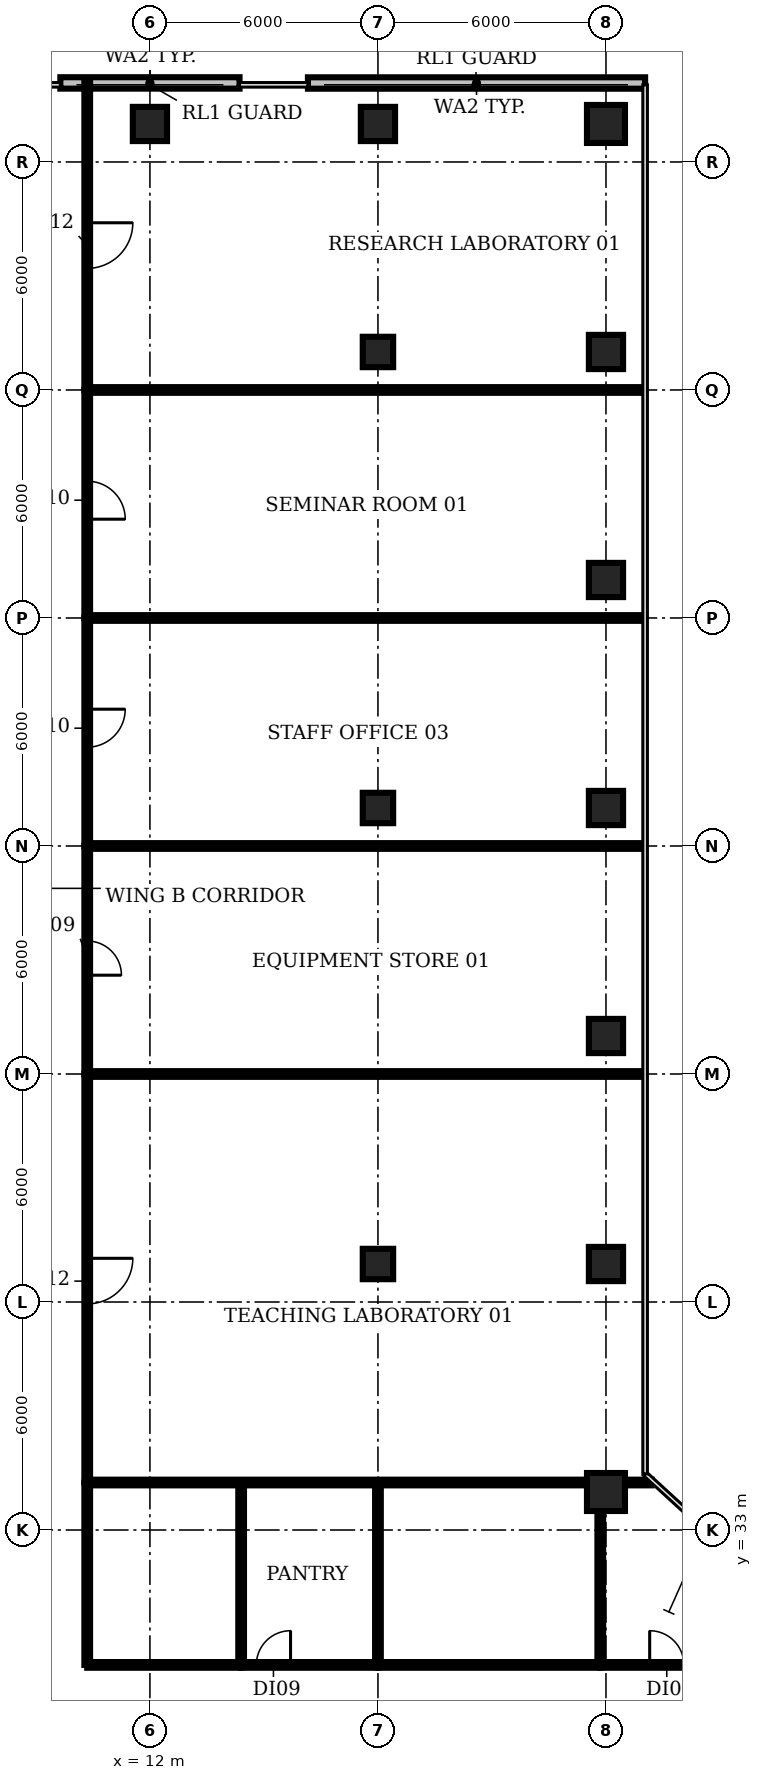
"""IFC4 building model, lengths in metres.
Left out: names, types, materials, properties, quantities, classifications, styles, units other than length and angle.
Written with IfcOpenShell. Run it as: python <this file> out.ifc"""

import sys

from ifc_helpers import new_model, si_unit, direction, frame, frame_2d, origin, origin_2d, place, context, subcontext, project, spatial, rectangle, circle, extrude, element, fill, save


model = new_model("IFC4")
c1 = context("Model", 3, precision=1e-05, world=origin(), true_north=direction((0.0, 1.0)))
c2 = subcontext(c1, "Body", "Model", "MODEL_VIEW")
j1 = project(units=[si_unit("LENGTHUNIT", "METRE"), si_unit("PLANEANGLEUNIT", "RADIAN")], contexts=[c1])
p1 = place(None, origin())
s1 = spatial("IfcSite", under=j1, at=p1, CompositionType="ELEMENT")
p2 = place(p1, origin())
s2 = spatial("IfcBuilding", under=s1, at=p2, CompositionType="ELEMENT")
p3 = place(p2, frame((0.0, 0.0, 100.4)))
s3 = spatial("IfcBuildingStorey", under=s2, at=p3, CompositionType="ELEMENT", Elevation=100.4)
p4 = place(p3, frame((12.0, 70.0, 0.0), z_axis=(0.0, 0.0, 1.0), x_axis=(1.0, 0.0, 0.0)))
e1 = element("IfcColumn", 1, at=p4, inside=s3, PredefinedType="COLUMN", context=c2, shape_type="SweptSolid", body=[
    extrude(rectangle(XDim=0.9, YDim=0.9, at=origin_2d()), origin(), (0.0, 0.0, 1.0), 3.85),
])
for number, where, z_axis, x_axis in (
    (2, (18.0, 40.0, 0.0), (0.0, 0.0, 1.0), (1.0, 0.0, 0.0)),
    (3, (18.0, 52.0, 0.0), (0.0, 0.0, 1.0), (1.0, 0.0, 0.0)),
    (4, (18.0, 64.0, 0.0), (0.0, 0.0, 1.0), (1.0, 0.0, 0.0)),
):
    element("IfcColumn", number, at=place(p3, frame(where, z_axis=z_axis, x_axis=x_axis)), inside=s3, PredefinedType="COLUMN", context=c2, shape_type="SweptSolid", body=[
        extrude(rectangle(XDim=0.8, YDim=0.8, at=origin_2d()), origin(), (0.0, 0.0, 1.0), 3.85),
    ])
p5 = place(p3, frame((18.0, 70.0, 0.0), z_axis=(0.0, 0.0, 1.0), x_axis=(1.0, 0.0, 0.0)))
e5 = element("IfcColumn", 5, at=p5, inside=s3, PredefinedType="COLUMN", context=c2, shape_type="SweptSolid", body=[
    extrude(rectangle(XDim=0.9, YDim=0.9, at=origin_2d()), origin(), (0.0, 0.0, 1.0), 3.85),
])
p6 = place(p3, frame((24.0, 34.0, 0.0), z_axis=(0.0, 0.0, 1.0), x_axis=(1.0, 0.0, 0.0)))
e6 = element("IfcColumn", 6, at=p6, inside=s3, PredefinedType="COLUMN", context=c2, shape_type="SweptSolid", body=[
    extrude(circle(Radius=0.5, at=origin_2d()), origin(), (0.0, 0.0, 1.0), 3.85),
])
for number, where, z_axis, x_axis in (
    (7, (24.0, 40.0, 0.0), (0.0, 0.0, 1.0), (1.0, 0.0, 0.0)),
    (8, (24.0, 46.0, 0.0), (0.0, 0.0, 1.0), (1.0, 0.0, 0.0)),
    (9, (24.0, 52.0, 0.0), (0.0, 0.0, 1.0), (1.0, 0.0, 0.0)),
    (10, (24.0, 58.0, 0.0), (0.0, 0.0, 1.0), (1.0, 0.0, 0.0)),
    (11, (24.0, 64.0, 0.0), (0.0, 0.0, 1.0), (1.0, 0.0, 0.0)),
):
    element("IfcColumn", number, at=place(p3, frame(where, z_axis=z_axis, x_axis=x_axis)), inside=s3, PredefinedType="COLUMN", context=c2, shape_type="SweptSolid", body=[
        extrude(rectangle(XDim=0.9, YDim=0.9, at=origin_2d()), origin(), (0.0, 0.0, 1.0), 3.85),
    ])
p7 = place(p3, frame((24.0, 70.0, 0.0), z_axis=(0.0, 0.0, 1.0), x_axis=(1.0, 0.0, 0.0)))
e12 = element("IfcColumn", 12, at=p7, inside=s3, PredefinedType="COLUMN", context=c2, shape_type="SweptSolid", body=[
    extrude(circle(Radius=0.5, at=origin_2d()), origin(), (0.0, 0.0, 1.0), 3.85),
])
p8 = place(p3, frame((25.03, 71.078, 0.0), z_axis=(0.0, 0.0, 1.0), x_axis=(-1.0, 0.0, 0.0)))
e13 = element("IfcWall", 13, at=p8, inside=s3, PredefinedType="SOLIDWALL", context=c2, shape_type="SweptSolid", body=[
    extrude(rectangle(XDim=8.873, YDim=0.3, at=frame_2d((4.436, 0.0))), origin(), (0.0, 0.0, 1.0), 3.85),
])
p9 = place(p3, frame((14.357, 71.08, 0.0), z_axis=(0.0, 0.0, 1.0), x_axis=(-1.0, 0.0, 0.0)))
e14 = element("IfcWall", 14, at=p9, inside=s3, PredefinedType="SOLIDWALL", context=c2, shape_type="SweptSolid", body=[
    extrude(rectangle(XDim=4.715, YDim=0.3, at=frame_2d((2.357, 0.0))), origin(), (0.0, 0.0, 1.0), 3.85),
])
p10 = place(p3, frame((10.35, 29.45, 0.0), z_axis=(0.0, 0.0, 1.0), x_axis=(0.0, 1.0, 0.0)))
e15 = element("IfcWall", 15, at=p10, inside=s3, PredefinedType="PARTITIONING", context=c2, shape_type="SweptSolid", body=[
    extrude(rectangle(XDim=4.8, YDim=0.15, at=frame_2d((2.4, 0.0))), origin(), (0.0, 0.0, 1.0), 2.83),
])
p11 = place(p3, frame((10.35, 29.45, 0.0), z_axis=(0.0, 0.0, 1.0), x_axis=(1.0, 0.0, 0.0)))
e16 = element("IfcWall", 16, at=p11, inside=s3, PredefinedType="PARTITIONING", context=c2, shape_type="SweptSolid", body=[
    extrude(rectangle(XDim=4.05, YDim=0.15, at=frame_2d((2.025, 0.0))), origin(), (0.0, 0.0, 1.0), 2.83),
])
p12 = place(p3, frame((10.35, 34.25, 0.0), z_axis=(0.0, 0.0, 1.0), x_axis=(1.0, 0.0, 0.0)))
e17 = element("IfcWall", 17, at=p12, inside=s3, PredefinedType="PARTITIONING", context=c2, shape_type="SweptSolid", body=[
    extrude(rectangle(XDim=14.85, YDim=0.15, at=frame_2d((7.425, 0.0))), origin(), (0.0, 0.0, 1.0), 2.83),
])
p13 = place(p3, frame((10.35, 45.0, 0.0), z_axis=(0.0, 0.0, 1.0), x_axis=(0.0, -1.0, 0.0)))
e18 = element("IfcWall", 18, at=p13, inside=s3, PredefinedType="PARTITIONING", context=c2, shape_type="SweptSolid", body=[
    extrude(rectangle(XDim=10.75, YDim=0.15, at=frame_2d((5.375, 0.0))), origin(), (0.0, 0.0, 1.0), 2.83),
])
p14 = place(p13, frame((4.85, 0.0, 0.0)))
e19 = element("IfcOpeningElement", 19, at=p14, cuts=e18, PredefinedType="OPENING", context=c2, shape_type="SweptSolid", body=[
    extrude(rectangle(XDim=1.2, YDim=2.1, at=frame_2d((0.6, 1.05))), frame((0.0, 0.085, 0.0), z_axis=(0.0, -1.0, 0.0), x_axis=(1.0, 0.0, 0.0)), (0.0, 0.0, 1.0), 0.17),
])
p15 = place(p3, frame((10.35, 45.0, 0.0), z_axis=(0.0, 0.0, 1.0), x_axis=(1.0, 0.0, 0.0)))
e20 = element("IfcWall", 20, at=p15, inside=s3, PredefinedType="PARTITIONING", context=c2, shape_type="SweptSolid", body=[
    extrude(rectangle(XDim=14.63, YDim=0.15, at=frame_2d((7.315, 0.0))), origin(), (0.0, 0.0, 1.0), 2.83),
])
p16 = place(p3, frame((10.35, 51.0, 0.0), z_axis=(0.0, 0.0, 1.0), x_axis=(0.0, -1.0, 0.0)))
e21 = element("IfcWall", 21, at=p16, inside=s3, PredefinedType="PARTITIONING", context=c2, shape_type="SweptSolid", body=[
    extrude(rectangle(XDim=6.0, YDim=0.15, at=frame_2d((3.0, 0.0))), origin(), (0.0, 0.0, 1.0), 2.83),
])
p17 = place(p16, frame((2.5, 0.0, 0.0)))
e22 = element("IfcOpeningElement", 22, at=p17, cuts=e21, PredefinedType="OPENING", context=c2, shape_type="SweptSolid", body=[
    extrude(rectangle(XDim=0.9, YDim=2.1, at=frame_2d((0.45, 1.05))), frame((0.0, 0.085, 0.0), z_axis=(0.0, -1.0, 0.0), x_axis=(1.0, 0.0, 0.0)), (0.0, 0.0, 1.0), 0.17),
])
p18 = place(p3, frame((10.35, 51.0, 0.0), z_axis=(0.0, 0.0, 1.0), x_axis=(1.0, 0.0, 0.0)))
e23 = element("IfcWall", 23, at=p18, inside=s3, PredefinedType="PARTITIONING", context=c2, shape_type="SweptSolid", body=[
    extrude(rectangle(XDim=14.63, YDim=0.15, at=frame_2d((7.315, 0.0))), origin(), (0.0, 0.0, 1.0), 2.83),
])
p19 = place(p3, frame((10.35, 57.0, 0.0), z_axis=(0.0, 0.0, 1.0), x_axis=(0.0, -1.0, 0.0)))
e24 = element("IfcWall", 24, at=p19, inside=s3, PredefinedType="PARTITIONING", context=c2, shape_type="SweptSolid", body=[
    extrude(rectangle(XDim=6.0, YDim=0.15, at=frame_2d((3.0, 0.0))), origin(), (0.0, 0.0, 1.0), 2.83),
])
p20 = place(p19, frame((2.4, 0.0, 0.0)))
e25 = element("IfcOpeningElement", 25, at=p20, cuts=e24, PredefinedType="OPENING", context=c2, shape_type="SweptSolid", body=[
    extrude(rectangle(XDim=1.0, YDim=2.1, at=frame_2d((0.5, 1.05))), frame((0.0, 0.085, 0.0), z_axis=(0.0, -1.0, 0.0), x_axis=(1.0, 0.0, 0.0)), (0.0, 0.0, 1.0), 0.17),
])
p21 = place(p3, frame((10.35, 57.0, 0.0), z_axis=(0.0, 0.0, 1.0), x_axis=(1.0, 0.0, 0.0)))
e26 = element("IfcWall", 26, at=p21, inside=s3, PredefinedType="PARTITIONING", context=c2, shape_type="SweptSolid", body=[
    extrude(rectangle(XDim=14.63, YDim=0.15, at=frame_2d((7.315, 0.0))), origin(), (0.0, 0.0, 1.0), 2.83),
])
p22 = place(p3, frame((10.35, 63.0, 0.0), z_axis=(0.0, 0.0, 1.0), x_axis=(0.0, -1.0, 0.0)))
e27 = element("IfcWall", 27, at=p22, inside=s3, PredefinedType="PARTITIONING", context=c2, shape_type="SweptSolid", body=[
    extrude(rectangle(XDim=6.0, YDim=0.15, at=frame_2d((3.0, 0.0))), origin(), (0.0, 0.0, 1.0), 2.83),
])
p23 = place(p22, frame((2.4, 0.0, 0.0)))
e28 = element("IfcOpeningElement", 28, at=p23, cuts=e27, PredefinedType="OPENING", context=c2, shape_type="SweptSolid", body=[
    extrude(rectangle(XDim=1.0, YDim=2.1, at=frame_2d((0.5, 1.05))), frame((0.0, 0.085, 0.0), z_axis=(0.0, -1.0, 0.0), x_axis=(1.0, 0.0, 0.0)), (0.0, 0.0, 1.0), 0.17),
])
p24 = place(p3, frame((10.35, 63.0, 0.0), z_axis=(0.0, 0.0, 1.0), x_axis=(1.0, 0.0, 0.0)))
e29 = element("IfcWall", 29, at=p24, inside=s3, PredefinedType="PARTITIONING", context=c2, shape_type="SweptSolid", body=[
    extrude(rectangle(XDim=14.63, YDim=0.15, at=frame_2d((7.315, 0.0))), origin(), (0.0, 0.0, 1.0), 2.83),
])
p25 = place(p3, frame((10.35, 71.09, 0.0), z_axis=(0.0, 0.0, 1.0), x_axis=(0.0, -1.0, 0.0)))
e30 = element("IfcWall", 30, at=p25, inside=s3, PredefinedType="PARTITIONING", context=c2, shape_type="SweptSolid", body=[
    extrude(rectangle(XDim=8.09, YDim=0.15, at=frame_2d((4.045, 0.0))), origin(), (0.0, 0.0, 1.0), 2.83),
])
p26 = place(p25, frame((3.69, 0.0, 0.0)))
e31 = element("IfcOpeningElement", 31, at=p26, cuts=e30, PredefinedType="OPENING", context=c2, shape_type="SweptSolid", body=[
    extrude(rectangle(XDim=1.2, YDim=2.1, at=frame_2d((0.6, 1.05))), frame((0.0, 0.085, 0.0), z_axis=(0.0, -1.0, 0.0), x_axis=(1.0, 0.0, 0.0)), (0.0, 0.0, 1.0), 0.17),
])
p27 = place(p3, frame((14.4, 29.45, 0.0), z_axis=(0.0, 0.0, 1.0), x_axis=(0.0, 1.0, 0.0)))
e32 = element("IfcWall", 32, at=p27, inside=s3, PredefinedType="PARTITIONING", context=c2, shape_type="SweptSolid", body=[
    extrude(rectangle(XDim=4.8, YDim=0.15, at=frame_2d((2.4, 0.0))), origin(), (0.0, 0.0, 1.0), 2.83),
])
p28 = place(p3, frame((14.4, 29.45, 0.0), z_axis=(0.0, 0.0, 1.0), x_axis=(1.0, 0.0, 0.0)))
e33 = element("IfcWall", 33, at=p28, inside=s3, PredefinedType="PARTITIONING", context=c2, shape_type="SweptSolid", body=[
    extrude(rectangle(XDim=3.6, YDim=0.15, at=frame_2d((1.8, 0.0))), origin(), (0.0, 0.0, 1.0), 2.83),
])
p29 = place(p28, frame((0.4, 0.0, 0.0)))
e34 = element("IfcOpeningElement", 34, at=p29, cuts=e33, PredefinedType="OPENING", context=c2, shape_type="SweptSolid", body=[
    extrude(rectangle(XDim=0.9, YDim=2.1, at=frame_2d((0.45, 1.05))), frame((0.0, 0.085, 0.0), z_axis=(0.0, -1.0, 0.0), x_axis=(1.0, 0.0, 0.0)), (0.0, 0.0, 1.0), 0.17),
])
p30 = place(p3, frame((18.0, 29.45, 0.0), z_axis=(0.0, 0.0, 1.0), x_axis=(0.0, 1.0, 0.0)))
e35 = element("IfcWall", 35, at=p30, inside=s3, PredefinedType="PARTITIONING", context=c2, shape_type="SweptSolid", body=[
    extrude(rectangle(XDim=4.8, YDim=0.15, at=frame_2d((2.4, 0.0))), origin(), (0.0, 0.0, 1.0), 2.83),
])
p31 = place(p3, frame((18.0, 29.45, 0.0), z_axis=(0.0, 0.0, 1.0), x_axis=(1.0, 0.0, 0.0)))
e36 = element("IfcWall", 36, at=p31, inside=s3, PredefinedType="PARTITIONING", context=c2, shape_type="SweptSolid", body=[
    extrude(rectangle(XDim=5.85, YDim=0.15, at=frame_2d((2.925, 0.0))), origin(), (0.0, 0.0, 1.0), 2.83),
])
p32 = place(p3, frame((23.85, 29.45, 0.0), z_axis=(0.0, 0.0, 1.0), x_axis=(0.0, 1.0, 0.0)))
e37 = element("IfcWall", 37, at=p32, inside=s3, PredefinedType="PARTITIONING", context=c2, shape_type="SweptSolid", body=[
    extrude(rectangle(XDim=4.8, YDim=0.15, at=frame_2d((2.4, 0.0))), origin(), (0.0, 0.0, 1.0), 2.83),
])
p33 = place(p3, frame((23.85, 29.45, 0.0), z_axis=(0.0, 0.0, 1.0), x_axis=(1.0, 0.0, 0.0)))
e38 = element("IfcWall", 38, at=p33, inside=s3, PredefinedType="PARTITIONING", context=c2, shape_type="SweptSolid", body=[
    extrude(rectangle(XDim=3.6, YDim=0.15, at=frame_2d((1.8, 0.0))), origin(), (0.0, 0.0, 1.0), 2.83),
])
p34 = place(p33, frame((1.3, 0.0, 0.0)))
e39 = element("IfcOpeningElement", 39, at=p34, cuts=e38, PredefinedType="OPENING", context=c2, shape_type="SweptSolid", body=[
    extrude(rectangle(XDim=0.9, YDim=2.1, at=frame_2d((0.45, 1.05))), frame((0.0, 0.085, 0.0), z_axis=(0.0, -1.0, 0.0), x_axis=(1.0, 0.0, 0.0)), (0.0, 0.0, 1.0), 0.17),
])
p35 = place(p14, origin())
e40 = element("IfcDoor", 40, at=p35, inside=s3, OperationType="SINGLE_SWING_LEFT", PredefinedType="DOOR", context=c2, shape_type="SweptSolid", body=[
    extrude(rectangle(XDim=1.2, YDim=2.1, at=frame_2d((0.6, 1.05))), frame((0.0, 0.025, 0.0), z_axis=(0.0, -1.0, 0.0), x_axis=(1.0, 0.0, 0.0)), (0.0, 0.0, 1.0), 0.05),
])
fill(e19, e40)
p36 = place(p17, origin())
e41 = element("IfcDoor", 41, at=p36, inside=s3, OperationType="SINGLE_SWING_RIGHT", PredefinedType="DOOR", context=c2, shape_type="SweptSolid", body=[
    extrude(rectangle(XDim=0.9, YDim=2.1, at=frame_2d((0.45, 1.05))), frame((0.0, 0.025, 0.0), z_axis=(0.0, -1.0, 0.0), x_axis=(1.0, 0.0, 0.0)), (0.0, 0.0, 1.0), 0.05),
])
fill(e22, e41)
p37 = place(p20, origin())
e42 = element("IfcDoor", 42, at=p37, inside=s3, OperationType="SINGLE_SWING_LEFT", PredefinedType="DOOR", context=c2, shape_type="SweptSolid", body=[
    extrude(rectangle(XDim=1.0, YDim=2.1, at=frame_2d((0.5, 1.05))), frame((0.0, 0.025, 0.0), z_axis=(0.0, -1.0, 0.0), x_axis=(1.0, 0.0, 0.0)), (0.0, 0.0, 1.0), 0.05),
])
fill(e25, e42)
p38 = place(p23, origin())
e43 = element("IfcDoor", 43, at=p38, inside=s3, OperationType="SINGLE_SWING_RIGHT", PredefinedType="DOOR", context=c2, shape_type="SweptSolid", body=[
    extrude(rectangle(XDim=1.0, YDim=2.1, at=frame_2d((0.5, 1.05))), frame((0.0, 0.025, 0.0), z_axis=(0.0, -1.0, 0.0), x_axis=(1.0, 0.0, 0.0)), (0.0, 0.0, 1.0), 0.05),
])
fill(e28, e43)
p39 = place(p26, origin())
e44 = element("IfcDoor", 44, at=p39, inside=s3, OperationType="SINGLE_SWING_LEFT", PredefinedType="DOOR", context=c2, shape_type="SweptSolid", body=[
    extrude(rectangle(XDim=1.2, YDim=2.1, at=frame_2d((0.6, 1.05))), frame((0.0, 0.025, 0.0), z_axis=(0.0, -1.0, 0.0), x_axis=(1.0, 0.0, 0.0)), (0.0, 0.0, 1.0), 0.05),
])
fill(e31, e44)
p40 = place(p29, origin())
e45 = element("IfcDoor", 45, at=p40, inside=s3, OperationType="SINGLE_SWING_RIGHT", PredefinedType="DOOR", context=c2, shape_type="SweptSolid", body=[
    extrude(rectangle(XDim=0.9, YDim=2.1, at=frame_2d((0.45, 1.05))), frame((0.0, 0.025, 0.0), z_axis=(0.0, -1.0, 0.0), x_axis=(1.0, 0.0, 0.0)), (0.0, 0.0, 1.0), 0.05),
])
fill(e34, e45)
p41 = place(p34, origin())
e46 = element("IfcDoor", 46, at=p41, inside=s3, OperationType="SINGLE_SWING_LEFT", PredefinedType="DOOR", context=c2, shape_type="SweptSolid", body=[
    extrude(rectangle(XDim=0.9, YDim=2.1, at=frame_2d((0.45, 1.05))), frame((0.0, 0.025, 0.0), z_axis=(0.0, -1.0, 0.0), x_axis=(1.0, 0.0, 0.0)), (0.0, 0.0, 1.0), 0.05),
])
fill(e39, e46)
save(model, sys.argv[1])
